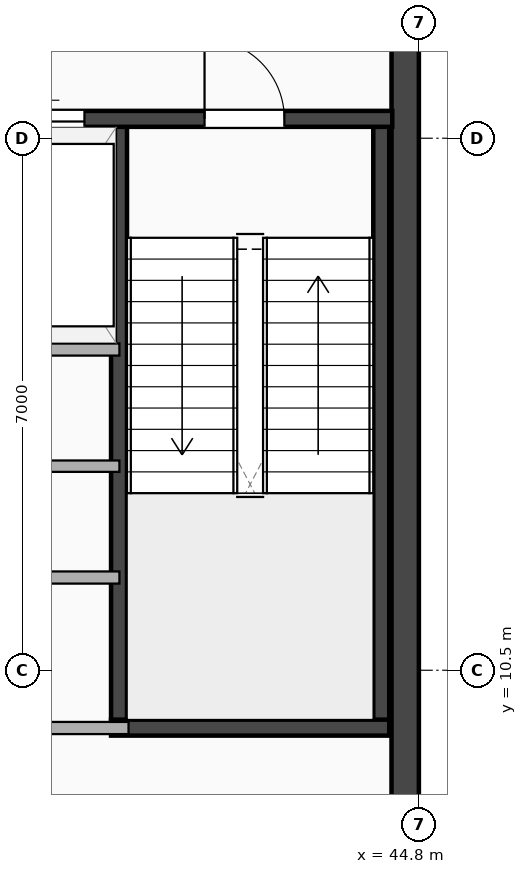
"""IFC4 building model, lengths in metres.
Left out: names, types, materials, properties, quantities, classifications, styles, units other than length and angle.
Written with IfcOpenShell. Run it as: python <this file> out.ifc"""

import sys

from ifc_helpers import new_model, si_unit, direction, frame, frame_2d, origin, place, context, subcontext, project, spatial, rectangle, extrude, element, fill, save


model = new_model("IFC4")
c1 = context("Model", 3, precision=1e-05, world=origin(), true_north=direction((0.0, 1.0)))
c2 = subcontext(c1, "Body", "Model", "MODEL_VIEW")
j1 = project(units=[si_unit("LENGTHUNIT", "METRE"), si_unit("PLANEANGLEUNIT", "RADIAN")], contexts=[c1])
p1 = place(None, origin())
s1 = spatial("IfcSite", under=j1, at=p1, CompositionType="ELEMENT")
p2 = place(p1, origin())
s2 = spatial("IfcBuilding", under=s1, at=p2, CompositionType="ELEMENT")
p3 = place(p2, frame((0.0, 0.0, 312.5)))
s3 = spatial("IfcBuildingStorey", under=s2, at=p3, CompositionType="ELEMENT", Elevation=312.5)
p4 = place(p3, frame((44.62, 3.5, 0.0), z_axis=(0.0, 0.0, 1.0), x_axis=(0.0, 1.0, 0.0)))
e1 = element("IfcWall", 1, at=p4, inside=s3, PredefinedType="SHEAR", context=c2, shape_type="SweptSolid", body=[
    extrude(rectangle(XDim=21.2, YDim=0.36, at=frame_2d((10.6, 0.0))), origin(), (0.0, 0.0, 1.0), 4.3),
])
for number, where, z_axis, x_axis in (
    (2, (40.855, 9.745, 0.0), (0.0, 0.0, 1.0), (0.0, 1.0, 0.0)),
    (3, (44.305, 9.745, 0.0), (0.0, 0.0, 1.0), (0.0, 1.0, 0.0)),
):
    element("IfcWall", number, at=place(p3, frame(where, z_axis=z_axis, x_axis=x_axis)), inside=s3, PredefinedType="SHEAR", context=c2, shape_type="SweptSolid", body=[
        extrude(rectangle(XDim=8.01, YDim=0.21, at=frame_2d((4.005, 0.0))), origin(), (0.0, 0.0, 1.0), 4.3),
    ])
p5 = place(p3, frame((40.75, 9.745, 0.0), z_axis=(0.0, 0.0, 1.0), x_axis=(1.0, 0.0, 0.0)))
e4 = element("IfcWall", 4, at=p5, inside=s3, PredefinedType="SHEAR", context=c2, shape_type="SweptSolid", body=[
    extrude(rectangle(XDim=3.66, YDim=0.21, at=frame_2d((1.83, 0.0))), origin(), (0.0, 0.0, 1.0), 4.3),
])
p6 = place(p3, frame((37.25, 17.755, 0.0), z_axis=(0.0, 0.0, 1.0), x_axis=(1.0, 0.0, 0.0)))
e5 = element("IfcWall", 5, at=p6, inside=s3, PredefinedType="SHEAR", context=c2, shape_type="SweptSolid", body=[
    extrude(rectangle(XDim=7.2, YDim=0.21, at=frame_2d((3.6, 0.0))), origin(), (0.0, 0.0, 1.0), 4.3),
])
p7 = place(p6, frame((2.05, 0.0, 0.0)))
e6 = element("IfcOpeningElement", 6, at=p7, cuts=e5, PredefinedType="OPENING", context=c2, shape_type="SweptSolid", body=[
    extrude(rectangle(XDim=1.1, YDim=2.18, at=frame_2d((0.55, 1.09))), frame((0.0, 0.115, 0.0), z_axis=(0.0, -1.0, 0.0), x_axis=(1.0, 0.0, 0.0)), (0.0, 0.0, 1.0), 0.23),
])
p8 = place(p6, frame((5.78, 0.0, 0.0), z_axis=(0.0, 0.0, 1.0), x_axis=(-1.0, 0.0, 0.0)))
e7 = element("IfcOpeningElement", 7, at=p8, cuts=e5, PredefinedType="OPENING", context=c2, shape_type="SweptSolid", body=[
    extrude(rectangle(XDim=1.05, YDim=2.15, at=frame_2d((0.525, 1.075))), frame((0.0, 0.115, 0.0), z_axis=(0.0, -1.0, 0.0), x_axis=(1.0, 0.0, 0.0)), (0.0, 0.0, 1.0), 0.23),
])
p9 = place(p3, frame((37.25, 14.72, 0.0), z_axis=(0.0, 0.0, 1.0), x_axis=(1.0, 0.0, 0.0)))
e8 = element("IfcWall", 8, at=p9, inside=s3, PredefinedType="PARTITIONING", context=c2, shape_type="SweptSolid", body=[
    extrude(rectangle(XDim=3.61, YDim=0.16, at=frame_2d((1.805, 0.0))), origin(), (0.0, 0.0, 1.0), 4.3),
])
p10 = place(p3, frame((37.25, 11.72, 0.0), z_axis=(0.0, 0.0, 1.0), x_axis=(1.0, 0.0, 0.0)))
e9 = element("IfcWall", 9, at=p10, inside=s3, PredefinedType="PARTITIONING", context=c2, shape_type="SweptSolid", body=[
    extrude(rectangle(XDim=3.61, YDim=0.16, at=frame_2d((1.805, 0.0))), origin(), (0.0, 0.0, 1.0), 4.3),
])
p11 = place(p10, frame((1.345, 0.0, 0.0)))
e10 = element("IfcOpeningElement", 10, at=p11, cuts=e9, PredefinedType="OPENING", context=c2, shape_type="SweptSolid", body=[
    extrude(rectangle(XDim=0.92, YDim=2.08, at=frame_2d((0.46, 1.04))), frame((0.0, 0.09, 0.0), z_axis=(0.0, -1.0, 0.0), x_axis=(1.0, 0.0, 0.0)), (0.0, 0.0, 1.0), 0.18),
])
p12 = place(p3, frame((37.25, 13.185, 0.0), z_axis=(0.0, 0.0, 1.0), x_axis=(1.0, 0.0, 0.0)))
e11 = element("IfcWall", 11, at=p12, inside=s3, PredefinedType="PARTITIONING", context=c2, shape_type="SweptSolid", body=[
    extrude(rectangle(XDim=3.61, YDim=0.15, at=frame_2d((1.805, 0.0))), origin(), (0.0, 0.0, 1.0), 4.3),
])
p13 = place(p12, frame((1.365, 0.0, 0.0)))
e12 = element("IfcOpeningElement", 12, at=p13, cuts=e11, PredefinedType="OPENING", context=c2, shape_type="SweptSolid", body=[
    extrude(rectangle(XDim=0.88, YDim=2.08, at=frame_2d((0.44, 1.04))), frame((0.0, 0.085, 0.0), z_axis=(0.0, -1.0, 0.0), x_axis=(1.0, 0.0, 0.0)), (0.0, 0.0, 1.0), 0.17),
])
p14 = place(p3, frame((37.25, 9.74, 0.0), z_axis=(0.0, 0.0, 1.0), x_axis=(1.0, 0.0, 0.0)))
e13 = element("IfcWall", 13, at=p14, inside=s3, PredefinedType="PARTITIONING", context=c2, shape_type="SweptSolid", body=[
    extrude(rectangle(XDim=3.73, YDim=0.16, at=frame_2d((1.865, 0.0))), origin(), (0.0, 0.0, 1.0), 4.3),
])
p15 = place(p14, frame((2.25, 0.0, 0.0), z_axis=(0.0, 0.0, 1.0), x_axis=(-1.0, 0.0, 0.0)))
e14 = element("IfcOpeningElement", 14, at=p15, cuts=e13, PredefinedType="OPENING", context=c2, shape_type="SweptSolid", body=[
    extrude(rectangle(XDim=0.95, YDim=2.15, at=frame_2d((0.475, 1.075))), frame((0.0, 0.09, 0.0), z_axis=(0.0, -1.0, 0.0), x_axis=(1.0, 0.0, 0.0)), (0.0, 0.0, 1.0), 0.18),
])
p16 = place(p7, origin())
e15 = element("IfcDoor", 15, at=p16, inside=s3, OperationType="DOUBLE_DOOR_SLIDING", PredefinedType="DOOR", context=c2, shape_type="SweptSolid", body=[
    extrude(rectangle(XDim=1.1, YDim=2.18, at=frame_2d((0.55, 1.09))), frame((0.0, 0.025, 0.0), z_axis=(0.0, -1.0, 0.0), x_axis=(1.0, 0.0, 0.0)), (0.0, 0.0, 1.0), 0.05),
])
fill(e6, e15)
p17 = place(p8, origin())
e16 = element("IfcDoor", 16, at=p17, inside=s3, OperationType="SINGLE_SWING_LEFT", PredefinedType="DOOR", context=c2, shape_type="SweptSolid", body=[
    extrude(rectangle(XDim=1.05, YDim=2.15, at=frame_2d((0.525, 1.075))), frame((0.0, 0.025, 0.0), z_axis=(0.0, -1.0, 0.0), x_axis=(1.0, 0.0, 0.0)), (0.0, 0.0, 1.0), 0.05),
])
fill(e7, e16)
save(model, sys.argv[1])
